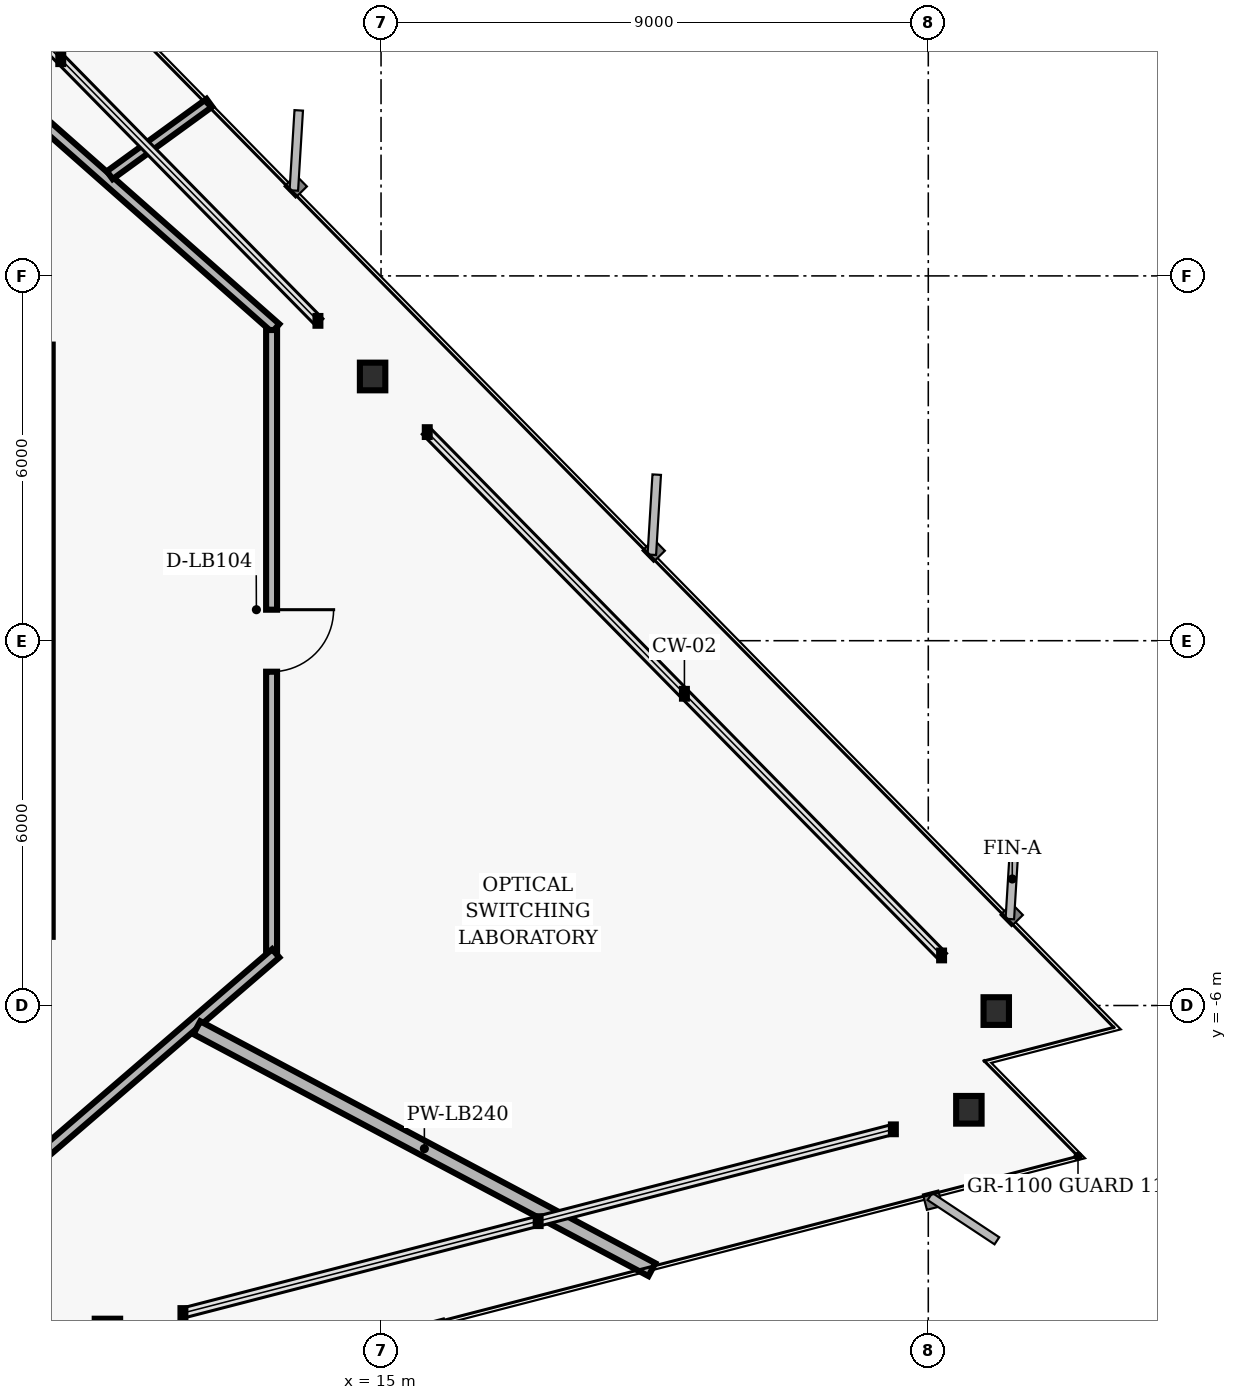
"""IFC4 building model, lengths in metres.
Left out: names, types, materials, properties, quantities, classifications, styles, units other than length and angle.
Written with IfcOpenShell. Run it as: python <this file> out.ifc"""

import sys

from ifc_helpers import new_model, si_unit, direction, frame, frame_2d, origin, origin_2d, place, context, subcontext, project, spatial, rectangle, i_section, extrude, element, fill, save


model = new_model("IFC4")
c1 = context("Model", 3, precision=1e-05, world=origin(), true_north=direction((0.0, 1.0)))
c2 = subcontext(c1, "Body", "Model", "MODEL_VIEW")
j1 = project(units=[si_unit("LENGTHUNIT", "METRE"), si_unit("PLANEANGLEUNIT", "RADIAN")], contexts=[c1])
p1 = place(None, origin())
s1 = spatial("IfcSite", under=j1, at=p1, CompositionType="ELEMENT")
p2 = place(p1, origin())
s2 = spatial("IfcBuilding", under=s1, at=p2, CompositionType="ELEMENT")
p3 = place(p2, frame((0.0, 0.0, 85.6)))
s3 = spatial("IfcBuildingStorey", under=s2, at=p3, CompositionType="ELEMENT", Elevation=85.6)
for number, where, z_axis, x_axis in (
    (1, (25.118, -6.092, 0.0), (0.0, 0.0, 1.0), (1.0, 0.0, 0.0)),
    (2, (14.861, 4.346, 0.0), (0.0, 0.0, 1.0), (1.0, 0.0, 0.0)),
    (3, (10.5, -11.379, 0.0), (0.0, 0.0, 1.0), (1.0, 0.0, 0.0)),
    (4, (24.667, -7.715, 0.0), (0.0, 0.0, 1.0), (1.0, 0.0, 0.0)),
):
    element("IfcColumn", number, at=place(p3, frame(where, z_axis=z_axis, x_axis=x_axis)), inside=s3, PredefinedType="COLUMN", context=c2, shape_type="SweptSolid", body=[
        extrude(i_section(OverallWidth=0.418, OverallDepth=0.455, WebThickness=0.042, FlangeThickness=0.068, FilletRadius=0.025, at=origin_2d()), origin(), (0.0, 0.0, 1.0), 3.04),
    ])
p4 = place(p3, frame((8.567, 9.29, 0.0), z_axis=(0.0, 0.0, 1.0), x_axis=(0.749626463267, -0.66186113768, 0.0)))
e5 = element("IfcWall", 5, at=p4, inside=s3, PredefinedType="PARTITIONING", context=c2, shape_type="SweptSolid", body=[
    extrude(rectangle(XDim=6.27, YDim=0.18, at=frame_2d((3.135, 0.0))), origin(), (0.0, 0.0, 1.0), 2.277),
])
p5 = place(p3, frame((13.2, 5.11, 0.0), z_axis=(0.0, 0.0, 1.0), x_axis=(0.0, -1.0, 0.0)))
e6 = element("IfcWall", 6, at=p5, inside=s3, PredefinedType="PARTITIONING", context=c2, shape_type="SweptSolid", body=[
    extrude(rectangle(XDim=10.22, YDim=0.18, at=frame_2d((5.11, 0.0))), origin(), (0.0, 0.0, 1.0), 2.277),
])
p6 = place(p5, frame((4.6, 0.0, 0.0)))
e7 = element("IfcOpeningElement", 7, at=p6, cuts=e6, PredefinedType="OPENING", context=c2, shape_type="SweptSolid", body=[
    extrude(rectangle(XDim=1.02, YDim=2.02, at=frame_2d((0.51, 1.01))), frame((0.0, 0.1, 0.0), z_axis=(0.0, -1.0, 0.0), x_axis=(1.0, 0.0, 0.0)), (0.0, 0.0, 1.0), 0.2),
])
p7 = place(p3, frame((13.268, -5.141, 0.0), z_axis=(0.0, 0.0, 1.0), x_axis=(-0.757534501725, -0.65279512766, 0.0)))
e8 = element("IfcWall", 8, at=p7, inside=s3, PredefinedType="PARTITIONING", context=c2, shape_type="SweptSolid", body=[
    extrude(rectangle(XDim=6.385, YDim=0.18, at=frame_2d((3.192, 0.0))), origin(), (0.0, 0.0, 1.0), 2.763),
])
p8 = place(p3, frame((11.971, -6.365, 0.0), z_axis=(0.0, 0.0, 1.0), x_axis=(0.882953434006, -0.469460577021, 0.0)))
e9 = element("IfcWall", 9, at=p8, inside=s3, PredefinedType="PARTITIONING", context=c2, shape_type="SweptSolid", body=[
    extrude(rectangle(XDim=8.476, YDim=0.24, at=frame_2d((4.238, 0.0))), origin(), (0.0, 0.0, 1.0), 2.763),
])
p9 = place(p3, frame((10.539, 7.657, 0.0), z_axis=(0.0, 0.0, 1.0), x_axis=(0.809038430179, 0.587755747308, 0.0)))
e10 = element("IfcWall", 10, at=p9, inside=s3, PredefinedType="PARTITIONING", context=c2, shape_type="SweptSolid", body=[
    extrude(rectangle(XDim=2.025, YDim=0.16, at=frame_2d((1.012, 0.0))), origin(), (0.0, 0.0, 1.0), 2.763),
])
p10 = place(p6, origin())
e11 = element("IfcDoor", 11, at=p10, inside=s3, OperationType="SINGLE_SWING_LEFT", PredefinedType="DOOR", context=c2, shape_type="SweptSolid", body=[
    extrude(rectangle(XDim=1.02, YDim=2.02, at=frame_2d((0.51, 1.01))), frame((0.0, 0.025, 0.0), z_axis=(0.0, -1.0, 0.0), x_axis=(1.0, 0.0, 0.0)), (0.0, 0.0, 1.0), 0.05),
])
fill(e7, e11)
save(model, sys.argv[1])
